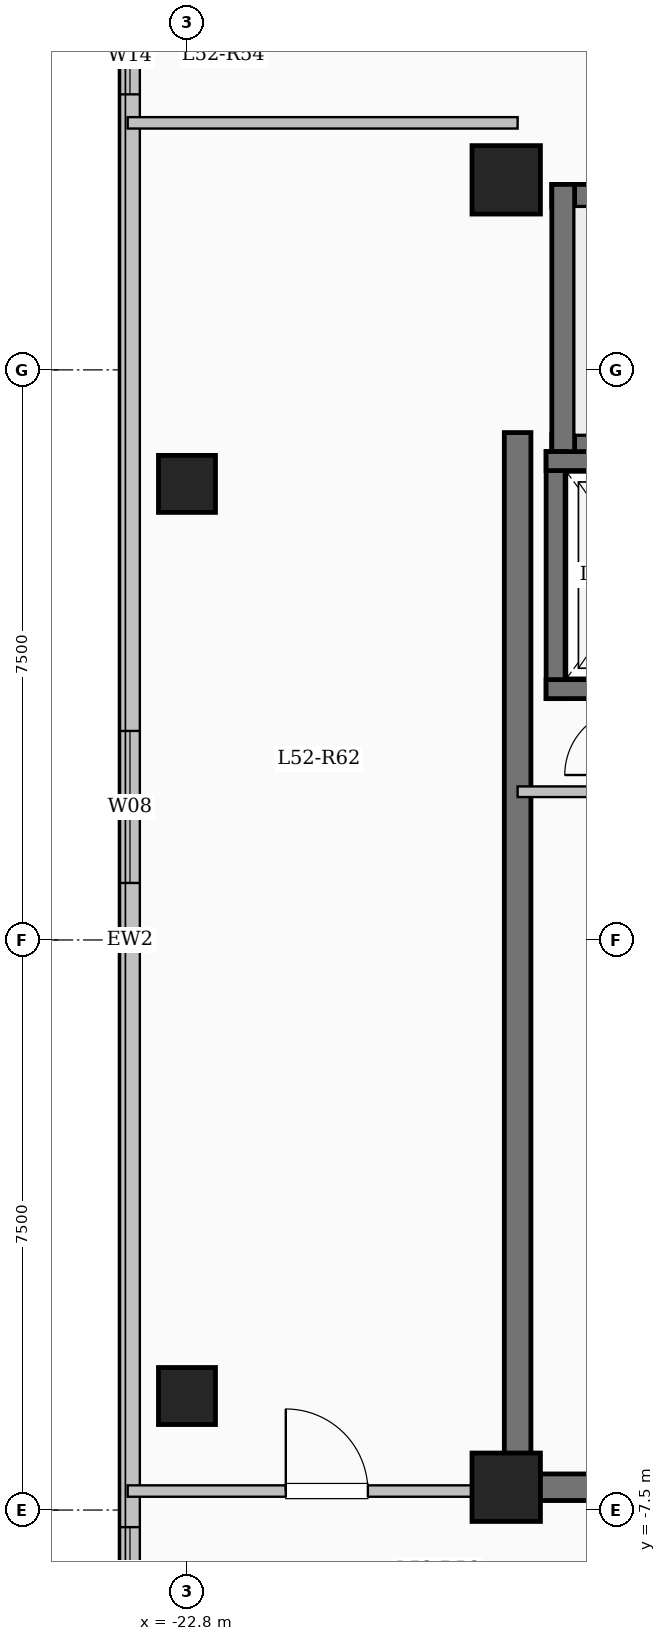
"""IFC4 building model, lengths in metres.
Left out: names, types, materials, properties, quantities, classifications, styles, units other than length and angle.
Written with IfcOpenShell. Run it as: python <this file> out.ifc"""

import sys

from ifc_helpers import new_model, si_unit, direction, frame, frame_2d, origin, origin_2d, place, context, subcontext, project, spatial, rectangle, extrude, element, fill, save


model = new_model("IFC4")
c1 = context("Model", 3, precision=1e-05, world=origin(), true_north=direction((0.0, 1.0)))
c2 = subcontext(c1, "Body", "Model", "MODEL_VIEW")
j1 = project(units=[si_unit("LENGTHUNIT", "METRE"), si_unit("PLANEANGLEUNIT", "RADIAN")], contexts=[c1])
p1 = place(None, origin())
s1 = spatial("IfcSite", under=j1, at=p1, CompositionType="ELEMENT")
p2 = place(p1, origin())
s2 = spatial("IfcBuilding", under=s1, at=p2, CompositionType="ELEMENT")
p3 = place(p2, frame((0.0, 0.0, 193.6)))
s3 = spatial("IfcBuildingStorey", under=s2, at=p3, CompositionType="ELEMENT", Elevation=193.6)
for number, where, z_axis, x_axis in (
    (1, (-18.6, -7.2, 0.0), (0.0, 0.0, 1.0), (1.0, 0.0, 0.0)),
    (2, (-18.6, 10.0, 0.0), (0.0, 0.0, 1.0), (1.0, 0.0, 0.0)),
):
    element("IfcColumn", number, at=place(p3, frame(where, z_axis=z_axis, x_axis=x_axis)), inside=s3, PredefinedType="COLUMN", context=c2, shape_type="SweptSolid", body=[
        extrude(rectangle(XDim=0.9, YDim=0.9, at=origin_2d()), origin(), (0.0, 0.0, 1.0), 3.35),
    ])
for number, where, z_axis, x_axis in (
    (3, (-22.8, -6.0, 0.0), (0.0, 0.0, 1.0), (1.0, 0.0, 0.0)),
    (4, (-22.8, 6.0, 0.0), (0.0, 0.0, 1.0), (1.0, 0.0, 0.0)),
):
    element("IfcColumn", number, at=place(p3, frame(where, z_axis=z_axis, x_axis=x_axis)), inside=s3, PredefinedType="COLUMN", context=c2, shape_type="SweptSolid", body=[
        extrude(rectangle(XDim=0.75, YDim=0.75, at=origin_2d()), origin(), (0.0, 0.0, 1.0), 3.35),
    ])
p4 = place(p3, frame((-23.55, -17.25, 0.0), z_axis=(0.0, 0.0, 1.0), x_axis=(0.0, 1.0, 0.0)))
e5 = element("IfcWall", 5, at=p4, inside=s3, PredefinedType="SOLIDWALL", context=c2, shape_type="SweptSolid", body=[
    extrude(rectangle(XDim=34.5, YDim=0.26, at=frame_2d((17.25, 0.0))), origin(), (0.0, 0.0, 1.0), 3.1),
])
p5 = place(p4, frame((2.825, 0.0, 0.9)))
e6 = element("IfcOpeningElement", 6, at=p5, cuts=e5, PredefinedType="OPENING", context=c2, shape_type="SweptSolid", body=[
    extrude(rectangle(XDim=2.2, YDim=1.75, at=frame_2d((1.1, 0.875))), frame((0.0, 0.14, 0.0), z_axis=(0.0, -1.0, 0.0), x_axis=(1.0, 0.0, 0.0)), (0.0, 0.0, 1.0), 0.28),
])
p6 = place(p4, frame((8.325, 0.0, 0.95)))
e7 = element("IfcOpeningElement", 7, at=p6, cuts=e5, PredefinedType="OPENING", context=c2, shape_type="SweptSolid", body=[
    extrude(rectangle(XDim=1.2, YDim=1.5, at=frame_2d((0.6, 0.75))), frame((0.0, 0.14, 0.0), z_axis=(0.0, -1.0, 0.0), x_axis=(1.0, 0.0, 0.0)), (0.0, 0.0, 1.0), 0.28),
])
p7 = place(p4, frame((18.0, 0.0, 0.9)))
e8 = element("IfcOpeningElement", 8, at=p7, cuts=e5, PredefinedType="OPENING", context=c2, shape_type="SweptSolid", body=[
    extrude(rectangle(XDim=2.0, YDim=1.7, at=frame_2d((1.0, 0.85))), frame((0.0, 0.14, 0.0), z_axis=(0.0, -1.0, 0.0), x_axis=(1.0, 0.0, 0.0)), (0.0, 0.0, 1.0), 0.28),
])
p8 = place(p4, frame((28.375, 0.0, 0.95)))
e9 = element("IfcOpeningElement", 9, at=p8, cuts=e5, PredefinedType="OPENING", context=c2, shape_type="SweptSolid", body=[
    extrude(rectangle(XDim=1.0, YDim=1.5, at=frame_2d((0.5, 0.75))), frame((0.0, 0.14, 0.0), z_axis=(0.0, -1.0, 0.0), x_axis=(1.0, 0.0, 0.0)), (0.0, 0.0, 1.0), 0.28),
])
p9 = place(p4, frame((31.125, 0.0, 0.9)))
e10 = element("IfcOpeningElement", 10, at=p9, cuts=e5, PredefinedType="OPENING", context=c2, shape_type="SweptSolid", body=[
    extrude(rectangle(XDim=2.0, YDim=1.7, at=frame_2d((1.0, 0.85))), frame((0.0, 0.14, 0.0), z_axis=(0.0, -1.0, 0.0), x_axis=(1.0, 0.0, 0.0)), (0.0, 0.0, 1.0), 0.28),
])
p10 = place(p3, frame((-18.0, 9.79, 0.0), z_axis=(0.0, 0.0, 1.0), x_axis=(1.0, 0.0, 0.0)))
e11 = element("IfcWall", 11, at=p10, inside=s3, PredefinedType="SHEAR", context=c2, shape_type="SweptSolid", body=[
    extrude(rectangle(XDim=8.0, YDim=0.3, at=frame_2d((4.0, 0.0))), origin(), (0.0, 0.0, 1.0), 3.35),
])
p11 = place(p3, frame((-18.0, 6.5, 0.0), z_axis=(0.0, 0.0, 1.0), x_axis=(1.0, 0.0, 0.0)))
e12 = element("IfcWall", 12, at=p11, inside=s3, PredefinedType="SHEAR", context=c2, shape_type="SweptSolid", body=[
    extrude(rectangle(XDim=8.0, YDim=0.3, at=frame_2d((4.0, 0.0))), origin(), (0.0, 0.0, 1.0), 3.35),
])
p12 = place(p11, frame((6.45, 0.0, 0.0)))
e13 = element("IfcOpeningElement", 13, at=p12, cuts=e12, PredefinedType="OPENING", context=c2, shape_type="SweptSolid", body=[
    extrude(rectangle(XDim=1.0, YDim=2.15, at=frame_2d((0.5, 1.075))), frame((0.0, 0.16, 0.0), z_axis=(0.0, -1.0, 0.0), x_axis=(1.0, 0.0, 0.0)), (0.0, 0.0, 1.0), 0.32),
])
p13 = place(p3, frame((-17.85, 6.35, 0.0), z_axis=(0.0, 0.0, 1.0), x_axis=(0.0, 1.0, 0.0)))
e14 = element("IfcWall", 14, at=p13, inside=s3, PredefinedType="SHEAR", context=c2, shape_type="SweptSolid", body=[
    extrude(rectangle(XDim=3.59, YDim=0.3, at=frame_2d((1.795, 0.0))), origin(), (0.0, 0.0, 1.0), 3.35),
])
p14 = place(p3, frame((-17.95, 3.175, 0.0), z_axis=(0.0, 0.0, 1.0), x_axis=(0.0, 1.0, 0.0)))
e15 = element("IfcWall", 15, at=p14, inside=s3, PredefinedType="SHEAR", context=c2, shape_type="SweptSolid", body=[
    extrude(rectangle(XDim=3.25, YDim=0.25, at=frame_2d((1.625, 0.0))), origin(), (0.0, 0.0, 1.0), 3.35),
])
for number, where, z_axis, x_axis in (
    (16, (-18.075, 3.3, 0.0), (0.0, 0.0, 1.0), (1.0, 0.0, 0.0)),
    (17, (-18.075, 6.3, 0.0), (0.0, 0.0, 1.0), (1.0, 0.0, 0.0)),
):
    element("IfcWall", number, at=place(p3, frame(where, z_axis=z_axis, x_axis=x_axis)), inside=s3, PredefinedType="SHEAR", context=c2, shape_type="SweptSolid", body=[
        extrude(rectangle(XDim=2.55, YDim=0.25, at=frame_2d((1.275, 0.0))), origin(), (0.0, 0.0, 1.0), 3.35),
    ])
p15 = place(p3, frame((-18.45, -7.375, 0.0), z_axis=(0.0, 0.0, 1.0), x_axis=(0.0, 1.0, 0.0)))
e18 = element("IfcWall", 18, at=p15, inside=s3, PredefinedType="SHEAR", context=c2, shape_type="SweptSolid", body=[
    extrude(rectangle(XDim=14.05, YDim=0.35, at=frame_2d((7.025, 0.0))), origin(), (0.0, 0.0, 1.0), 3.35),
])
p16 = place(p3, frame((-18.625, -7.2, 0.0), z_axis=(0.0, 0.0, 1.0), x_axis=(1.0, 0.0, 0.0)))
e19 = element("IfcWall", 19, at=p16, inside=s3, PredefinedType="SHEAR", context=c2, shape_type="SweptSolid", body=[
    extrude(rectangle(XDim=8.55, YDim=0.35, at=frame_2d((4.275, 0.0))), origin(), (0.0, 0.0, 1.0), 3.35),
])
p17 = place(p16, frame((1.725, 0.0, 0.0)))
e20 = element("IfcOpeningElement", 20, at=p17, cuts=e19, PredefinedType="OPENING", context=c2, shape_type="SweptSolid", body=[
    extrude(rectangle(XDim=1.12, YDim=2.15, at=frame_2d((0.56, 1.075))), frame((0.0, 0.185, 0.0), z_axis=(0.0, -1.0, 0.0), x_axis=(1.0, 0.0, 0.0)), (0.0, 0.0, 1.0), 0.37),
])
p18 = place(p3, frame((-18.45, 1.95, 0.0), z_axis=(0.0, 0.0, 1.0), x_axis=(1.0, 0.0, 0.0)))
e21 = element("IfcWall", 21, at=p18, inside=s3, PredefinedType="PARTITIONING", context=c2, shape_type="SweptSolid", body=[
    extrude(rectangle(XDim=3.15, YDim=0.14, at=frame_2d((1.575, 0.0))), origin(), (0.0, 0.0, 1.0), 3.1),
])
p19 = place(p18, frame((1.9, 0.0, 0.0)))
e22 = element("IfcOpeningElement", 22, at=p19, cuts=e21, PredefinedType="OPENING", context=c2, shape_type="SweptSolid", body=[
    extrude(rectangle(XDim=0.88, YDim=2.1, at=frame_2d((0.44, 1.05))), frame((0.0, 0.08, 0.0), z_axis=(0.0, -1.0, 0.0), x_axis=(1.0, 0.0, 0.0)), (0.0, 0.0, 1.0), 0.16),
])
p20 = place(p3, frame((-23.58, -7.25, 0.0), z_axis=(0.0, 0.0, 1.0), x_axis=(1.0, 0.0, 0.0)))
e23 = element("IfcWall", 23, at=p20, inside=s3, PredefinedType="PARTITIONING", context=c2, shape_type="SweptSolid", body=[
    extrude(rectangle(XDim=5.13, YDim=0.15, at=frame_2d((2.565, 0.0))), origin(), (0.0, 0.0, 1.0), 3.1),
])
p21 = place(p20, frame((2.08, 0.0, 0.0)))
e24 = element("IfcOpeningElement", 24, at=p21, cuts=e23, PredefinedType="OPENING", context=c2, shape_type="SweptSolid", body=[
    extrude(rectangle(XDim=1.08, YDim=2.15, at=frame_2d((0.54, 1.075))), frame((0.0, 0.085, 0.0), z_axis=(0.0, -1.0, 0.0), x_axis=(1.0, 0.0, 0.0)), (0.0, 0.0, 1.0), 0.17),
])
p22 = place(p3, frame((-23.58, 10.75, 0.0), z_axis=(0.0, 0.0, 1.0), x_axis=(1.0, 0.0, 0.0)))
e25 = element("IfcWall", 25, at=p22, inside=s3, PredefinedType="PARTITIONING", context=c2, shape_type="SweptSolid", body=[
    extrude(rectangle(XDim=5.13, YDim=0.15, at=frame_2d((2.565, 0.0))), origin(), (0.0, 0.0, 1.0), 3.1),
])
p23 = place(p6, origin())
e26 = element("IfcWindow", 26, at=p23, inside=s3, PartitioningType="SINGLE_PANEL", PredefinedType="WINDOW", context=c2, shape_type="SweptSolid", body=[
    extrude(rectangle(XDim=1.2, YDim=1.5, at=frame_2d((0.6, 0.75))), frame((0.0, 0.03, 0.0), z_axis=(0.0, -1.0, 0.0), x_axis=(1.0, 0.0, 0.0)), (0.0, 0.0, 1.0), 0.06),
])
fill(e7, e26)
p24 = place(p7, origin())
e27 = element("IfcWindow", 27, at=p24, inside=s3, PartitioningType="SINGLE_PANEL", PredefinedType="WINDOW", context=c2, shape_type="SweptSolid", body=[
    extrude(rectangle(XDim=2.0, YDim=1.7, at=frame_2d((1.0, 0.85))), frame((0.0, 0.03, 0.0), z_axis=(0.0, -1.0, 0.0), x_axis=(1.0, 0.0, 0.0)), (0.0, 0.0, 1.0), 0.06),
])
fill(e8, e27)
p25 = place(p8, origin())
e28 = element("IfcWindow", 28, at=p25, inside=s3, PartitioningType="SINGLE_PANEL", PredefinedType="WINDOW", context=c2, shape_type="SweptSolid", body=[
    extrude(rectangle(XDim=1.0, YDim=1.5, at=frame_2d((0.5, 0.75))), frame((0.0, 0.03, 0.0), z_axis=(0.0, -1.0, 0.0), x_axis=(1.0, 0.0, 0.0)), (0.0, 0.0, 1.0), 0.06),
])
fill(e9, e28)
p26 = place(p21, origin())
e29 = element("IfcDoor", 29, at=p26, inside=s3, OperationType="SINGLE_SWING_LEFT", PredefinedType="DOOR", context=c2, shape_type="SweptSolid", body=[
    extrude(rectangle(XDim=1.08, YDim=2.15, at=frame_2d((0.54, 1.075))), frame((0.0, 0.025, 0.0), z_axis=(0.0, -1.0, 0.0), x_axis=(1.0, 0.0, 0.0)), (0.0, 0.0, 1.0), 0.05),
])
fill(e24, e29)
save(model, sys.argv[1])
